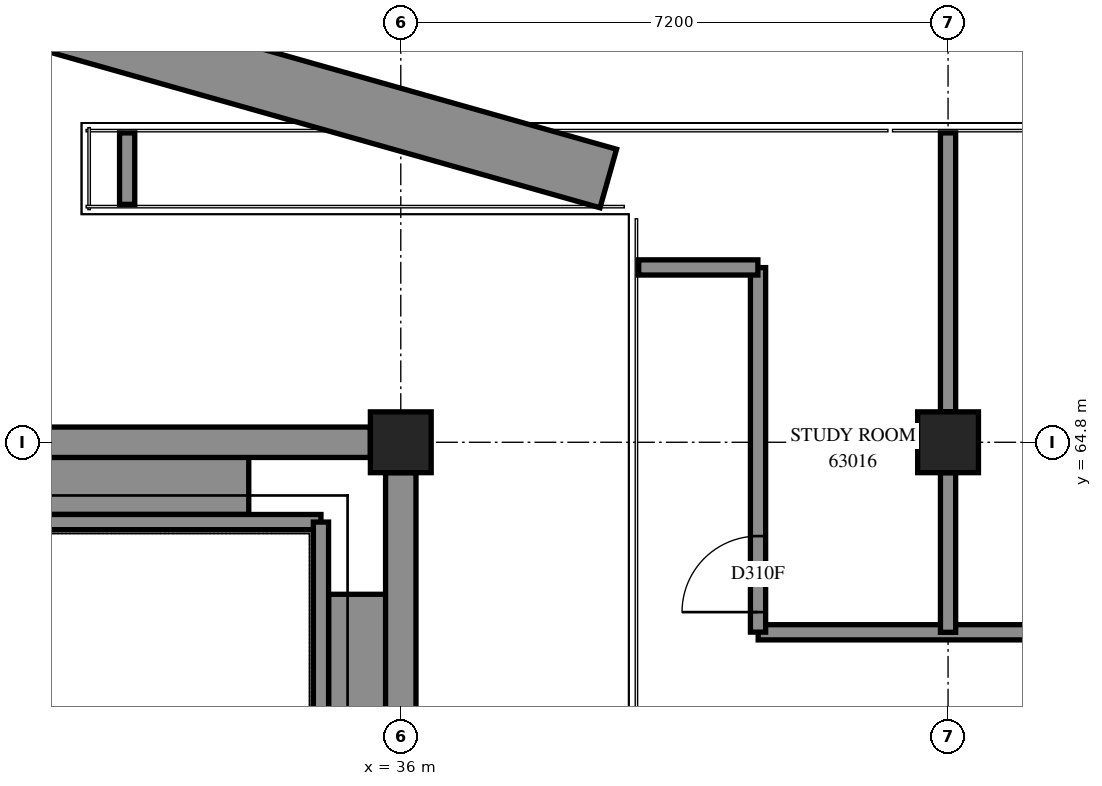
"""IFC4 building model, lengths in metres.
Left out: names, types, materials, properties, quantities, classifications, styles, units other than length and angle.
Written with IfcOpenShell. Run it as: python <this file> out.ifc"""

import sys

from ifc_helpers import new_model, si_unit, direction, frame, frame_2d, origin, origin_2d, place, context, subcontext, project, spatial, polyline, rectangle, outline, extrude, element, fill, save


model = new_model("IFC4")
c1 = context("Model", 3, precision=1e-05, world=origin(), true_north=direction((0.0, 1.0)))
c2 = subcontext(c1, "Body", "Model", "MODEL_VIEW")
j1 = project(units=[si_unit("LENGTHUNIT", "METRE"), si_unit("PLANEANGLEUNIT", "RADIAN")], contexts=[c1])
p1 = place(None, origin())
s1 = spatial("IfcSite", under=j1, at=p1, CompositionType="ELEMENT")
p2 = place(p1, origin())
s2 = spatial("IfcBuilding", under=s1, at=p2, CompositionType="ELEMENT")
p3 = place(p2, frame((0.0, 0.0, 230.4)))
s3 = spatial("IfcBuildingStorey", under=s2, at=p3, CompositionType="ELEMENT", Elevation=230.4)
for number, where, z_axis, x_axis in (
    (1, (36.0, 64.8, 0.0), (0.0, 0.0, 1.0), (1.0, 0.0, 0.0)),
    (2, (43.2, 64.8, 0.0), (0.0, 0.0, 1.0), (1.0, 0.0, 0.0)),
):
    element("IfcColumn", number, at=place(p3, frame(where, z_axis=z_axis, x_axis=x_axis)), inside=s3, PredefinedType="COLUMN", context=c2, shape_type="SweptSolid", body=[
        extrude(rectangle(XDim=0.8, YDim=0.8, at=origin_2d()), origin(), (0.0, 0.0, 1.0), 3.9),
    ])
for number, where, z_axis, x_axis in (
    (3, (30.8, 64.25, 0.0), (0.0, 0.0, 1.0), (1.0, 0.0, 0.0)),
    (4, (35.45, 62.8, 0.0), (0.0, 0.0, 1.0), (0.0, -1.0, 0.0)),
):
    element("IfcWall", number, at=place(p3, frame(where, z_axis=z_axis, x_axis=x_axis)), inside=s3, PredefinedType="SOLIDWALL", context=c2, shape_type="SweptSolid", body=[
        extrude(rectangle(XDim=3.2, YDim=0.8, at=frame_2d((1.6, 0.0))), origin(), (0.0, 0.0, 1.0), 0.65),
    ])
p4 = place(p3, frame((38.73, 68.27, 0.0), z_axis=(0.0, 0.0, 1.0), x_axis=(-0.9622613389, 0.2721270213, 0.0)))
e5 = element("IfcWall", 5, at=p4, inside=s3, PredefinedType="SOLIDWALL", context=c2, shape_type="SweptSolid", body=[
    extrude(rectangle(XDim=8.241, YDim=0.8, at=frame_2d((4.12, 0.0))), origin(), (0.0, 0.0, 1.0), 0.65),
])
p5 = place(p3, frame((27.75, 63.75, 0.0), z_axis=(0.0, 0.0, 1.0), x_axis=(1.0, 0.0, 0.0)))
e6 = element("IfcWall", 6, at=p5, inside=s3, PredefinedType="SOLIDWALL", context=c2, shape_type="SweptSolid", body=[
    extrude(outline(polyline([(-0.1, -0.1), (7.1, -0.1), (7.3, 0.1), (0.1, 0.1), (-0.1, -0.1)])), origin(), (0.0, 0.0, 1.0), 4.2),
])
p6 = place(p3, frame((34.95, 63.75, 0.0), z_axis=(0.0, 0.0, 1.0), x_axis=(0.0, -1.0, 0.0)))
e7 = element("IfcWall", 7, at=p6, inside=s3, PredefinedType="SOLIDWALL", context=c2, shape_type="SweptSolid", body=[
    extrude(outline(polyline([(0.1, -0.1), (7.3, -0.1), (7.1, 0.1), (-0.1, 0.1), (0.1, -0.1)])), origin(), (0.0, 0.0, 1.0), 4.2),
])
p7 = place(p3, frame((40.702, 62.3, 0.0), z_axis=(0.0, 0.0, 1.0), x_axis=(1.0, 0.0, 0.0)))
e8 = element("IfcWall", 8, at=p7, inside=s3, PredefinedType="PARTITIONING", context=c2, shape_type="SweptSolid", body=[
    extrude(rectangle(XDim=14.248, YDim=0.2, at=frame_2d((7.124, 0.0))), origin(), (0.0, 0.0, 1.0), 3.9),
])
p8 = place(p7, frame((6.361, 0.0, 0.0)))
e9 = element("IfcOpeningElement", 9, at=p8, cuts=e8, PredefinedType="OPENING", context=c2, shape_type="SweptSolid", body=[
    extrude(rectangle(XDim=1.0, YDim=2.1, at=frame_2d((0.5, 1.05))), frame((0.0, 0.11, 0.0), z_axis=(0.0, -1.0, 0.0), x_axis=(1.0, 0.0, 0.0)), (0.0, 0.0, 1.0), 0.22),
])
p9 = place(p7, frame((11.79, 0.0, 0.0)))
e10 = element("IfcOpeningElement", 10, at=p9, cuts=e8, PredefinedType="OPENING", context=c2, shape_type="SweptSolid", body=[
    extrude(rectangle(XDim=1.0, YDim=2.1, at=frame_2d((0.5, 1.05))), frame((0.0, 0.11, 0.0), z_axis=(0.0, -1.0, 0.0), x_axis=(1.0, 0.0, 0.0)), (0.0, 0.0, 1.0), 0.22),
])
p10 = place(p3, frame((40.7, 62.302, 0.0), z_axis=(0.0, 0.0, 1.0), x_axis=(0.0, 1.0, 0.0)))
e11 = element("IfcWall", 11, at=p10, inside=s3, PredefinedType="PARTITIONING", context=c2, shape_type="SweptSolid", body=[
    extrude(rectangle(XDim=4.796, YDim=0.2, at=frame_2d((2.398, 0.0))), origin(), (0.0, 0.0, 1.0), 3.9),
])
p11 = place(p10, frame((0.264, 0.0, 0.0)))
e12 = element("IfcOpeningElement", 12, at=p11, cuts=e11, PredefinedType="OPENING", context=c2, shape_type="SweptSolid", body=[
    extrude(rectangle(XDim=1.0, YDim=2.1, at=frame_2d((0.5, 1.05))), frame((0.0, 0.11, 0.0), z_axis=(0.0, -1.0, 0.0), x_axis=(1.0, 0.0, 0.0)), (0.0, 0.0, 1.0), 0.22),
])
p12 = place(p3, frame((43.2, 65.2, 0.0), z_axis=(0.0, 0.0, 1.0), x_axis=(0.0, 1.0, 0.0)))
e13 = element("IfcWall", 13, at=p12, inside=s3, PredefinedType="PARTITIONING", context=c2, shape_type="SweptSolid", body=[
    extrude(rectangle(XDim=3.67, YDim=0.2, at=frame_2d((1.835, 0.0))), origin(), (0.0, 0.0, 1.0), 3.9),
])
p13 = place(p3, frame((43.2, 62.3, 0.0), z_axis=(0.0, 0.0, 1.0), x_axis=(0.0, 1.0, 0.0)))
e14 = element("IfcWall", 14, at=p13, inside=s3, PredefinedType="PARTITIONING", context=c2, shape_type="SweptSolid", body=[
    extrude(rectangle(XDim=2.1, YDim=0.2, at=frame_2d((1.05, 0.0))), origin(), (0.0, 0.0, 1.0), 3.9),
])
p14 = place(p3, frame((39.13, 67.1, 0.0), z_axis=(0.0, 0.0, 1.0), x_axis=(1.0, 0.0, 0.0)))
e15 = element("IfcWall", 15, at=p14, inside=s3, PredefinedType="PARTITIONING", context=c2, shape_type="SweptSolid", body=[
    extrude(rectangle(XDim=1.568, YDim=0.2, at=frame_2d((0.784, 0.0))), origin(), (0.0, 0.0, 1.0), 3.9),
])
p15 = place(p3, frame((32.4, 67.93, 0.0), z_axis=(0.0, 0.0, 1.0), x_axis=(0.0, 1.0, 0.0)))
e16 = element("IfcWall", 16, at=p15, inside=s3, PredefinedType="PARTITIONING", context=c2, shape_type="SweptSolid", body=[
    extrude(rectangle(XDim=0.94, YDim=0.2, at=frame_2d((0.47, 0.0))), origin(), (0.0, 0.0, 1.0), 3.9),
])
p16 = place(p11, origin())
e17 = element("IfcDoor", 17, at=p16, inside=s3, OperationType="SINGLE_SWING_LEFT", PredefinedType="DOOR", context=c2, shape_type="SweptSolid", body=[
    extrude(rectangle(XDim=1.0, YDim=2.1, at=frame_2d((0.5, 1.05))), frame((0.0, 0.025, 0.0), z_axis=(0.0, -1.0, 0.0), x_axis=(1.0, 0.0, 0.0)), (0.0, 0.0, 1.0), 0.05),
])
fill(e12, e17)
save(model, sys.argv[1])
